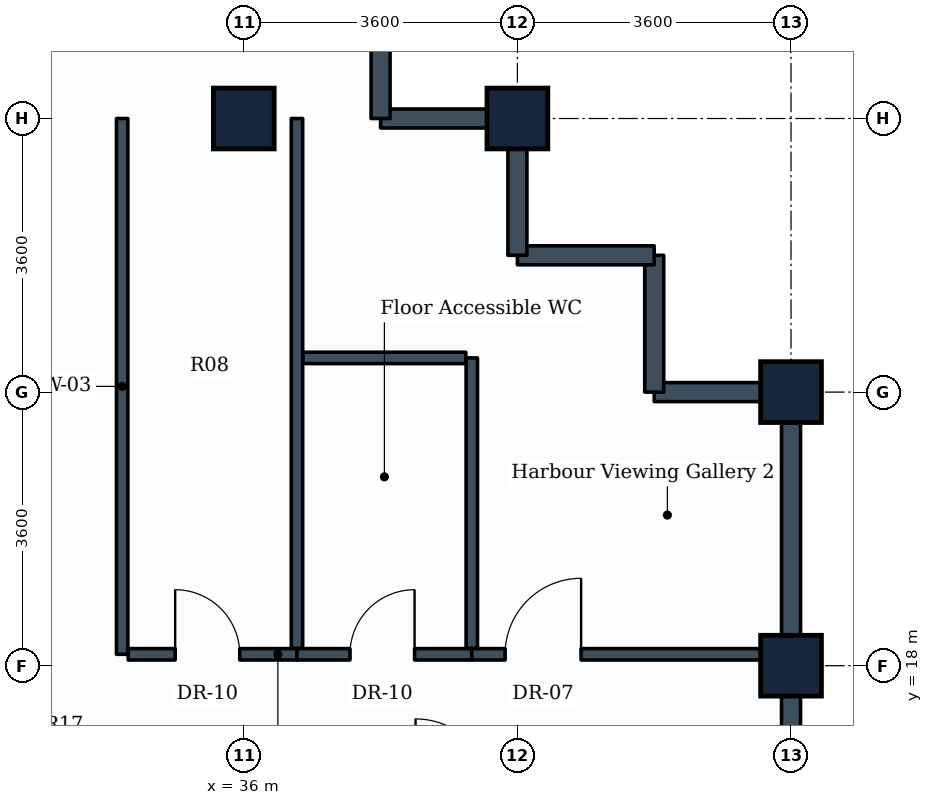
"""IFC4 building model, lengths in metres.
Left out: names, types, materials, properties, quantities, classifications, styles, units other than length and angle.
Written with IfcOpenShell. Run it as: python <this file> out.ifc"""

import sys

from ifc_helpers import new_model, si_unit, direction, frame, frame_2d, origin, origin_2d, place, context, subcontext, project, spatial, rectangle, extrude, element, fill, save


model = new_model("IFC4")
c1 = context("Model", 3, precision=1e-05, world=origin(), true_north=direction((0.0, 1.0)))
c2 = subcontext(c1, "Body", "Model", "MODEL_VIEW")
j1 = project(units=[si_unit("LENGTHUNIT", "METRE"), si_unit("PLANEANGLEUNIT", "RADIAN")], contexts=[c1])
p1 = place(None, origin())
s1 = spatial("IfcSite", under=j1, at=p1, CompositionType="ELEMENT")
p2 = place(p1, origin())
s2 = spatial("IfcBuilding", under=s1, at=p2, CompositionType="ELEMENT")
p3 = place(p2, frame((0.0, 0.0, 246.2)))
s3 = spatial("IfcBuildingStorey", under=s2, at=p3, CompositionType="ELEMENT", Elevation=246.2)
for number, where, z_axis, x_axis in (
    (1, (36.0, 25.2, 0.0), (0.0, 0.0, 1.0), (1.0, 0.0, 0.0)),
    (2, (39.6, 25.2, 0.0), (0.0, 0.0, 1.0), (1.0, 0.0, 0.0)),
    (3, (43.2, 18.0, 0.0), (0.0, 0.0, 1.0), (0.0, 1.0, 0.0)),
    (4, (43.2, 21.6, 0.0), (0.0, 0.0, 1.0), (0.0, 1.0, 0.0)),
):
    element("IfcColumn", number, at=place(p3, frame(where, z_axis=z_axis, x_axis=x_axis)), inside=s3, PredefinedType="COLUMN", context=c2, shape_type="SweptSolid", body=[
        extrude(rectangle(XDim=0.8, YDim=0.8, at=origin_2d()), origin(), (0.0, 0.0, 1.0), 3.6),
    ])
for number, where, z_axis, x_axis in (
    (5, (43.2, 18.0, 0.0), (0.0, 0.0, 1.0), (0.0, -1.0, 0.0)),
    (6, (43.2, 21.6, 0.0), (0.0, 0.0, 1.0), (0.0, -1.0, 0.0)),
):
    element("IfcWall", number, at=place(p3, frame(where, z_axis=z_axis, x_axis=x_axis)), inside=s3, PredefinedType="STANDARD", context=c2, shape_type="SweptSolid", body=[
        extrude(rectangle(XDim=3.6, YDim=0.25, at=frame_2d((1.8, 0.0))), origin(), (0.0, 0.0, 1.0), 2.83),
    ])
p4 = place(p3, frame((41.4, 21.6, 0.0), z_axis=(0.0, 0.0, 1.0), x_axis=(1.0, 0.0, 0.0)))
e7 = element("IfcWall", 7, at=p4, inside=s3, PredefinedType="STANDARD", context=c2, shape_type="SweptSolid", body=[
    extrude(rectangle(XDim=1.8, YDim=0.25, at=frame_2d((0.9, 0.0))), origin(), (0.0, 0.0, 1.0), 2.83),
])
for number, where, z_axis, x_axis in (
    (8, (41.4, 23.4, 0.0), (0.0, 0.0, 1.0), (0.0, -1.0, 0.0)),
    (9, (39.6, 23.4, 0.0), (0.0, 0.0, 1.0), (1.0, 0.0, 0.0)),
):
    element("IfcWall", number, at=place(p3, frame(where, z_axis=z_axis, x_axis=x_axis)), inside=s3, PredefinedType="STANDARD", context=c2, shape_type="SweptSolid", body=[
        extrude(rectangle(XDim=1.8, YDim=0.25, at=frame_2d((0.9, 0.0))), origin(), (0.0, 0.0, 1.0), 3.265),
    ])
for number, where, z_axis, x_axis in (
    (10, (39.6, 25.2, 0.0), (0.0, 0.0, 1.0), (0.0, -1.0, 0.0)),
    (11, (37.8, 25.2, 0.0), (0.0, 0.0, 1.0), (1.0, 0.0, 0.0)),
):
    element("IfcWall", number, at=place(p3, frame(where, z_axis=z_axis, x_axis=x_axis)), inside=s3, PredefinedType="STANDARD", context=c2, shape_type="SweptSolid", body=[
        extrude(rectangle(XDim=1.8, YDim=0.25, at=frame_2d((0.9, 0.0))), origin(), (0.0, 0.0, 1.0), 2.83),
    ])
p5 = place(p3, frame((37.8, 27.3, 0.0), z_axis=(0.0, 0.0, 1.0), x_axis=(0.0, -1.0, 0.0)))
e12 = element("IfcWall", 12, at=p5, inside=s3, PredefinedType="STANDARD", context=c2, shape_type="SweptSolid", body=[
    extrude(rectangle(XDim=2.1, YDim=0.25, at=frame_2d((1.05, 0.0))), origin(), (0.0, 0.0, 1.0), 2.83),
])
p6 = place(p3, frame((34.4, 18.15, 0.0), z_axis=(0.0, 0.0, 1.0), x_axis=(0.0, 1.0, 0.0)))
e13 = element("IfcWall", 13, at=p6, inside=s3, PredefinedType="PARTITIONING", context=c2, shape_type="SweptSolid", body=[
    extrude(rectangle(XDim=7.05, YDim=0.15, at=frame_2d((3.525, 0.0))), origin(), (0.0, 0.0, 1.0), 2.83),
])
p7 = place(p3, frame((34.479, 18.15, 0.0), z_axis=(0.0, 0.0, 1.0), x_axis=(1.0, 0.0, 0.0)))
e14 = element("IfcWall", 14, at=p7, inside=s3, PredefinedType="PARTITIONING", context=c2, shape_type="SweptSolid", body=[
    extrude(rectangle(XDim=2.221, YDim=0.15, at=frame_2d((1.11, 0.0))), origin(), (0.0, 0.0, 1.0), 3.265),
])
p8 = place(p7, frame((0.618, 0.0, 0.0)))
e15 = element("IfcOpeningElement", 15, at=p8, cuts=e14, PredefinedType="OPENING", context=c2, shape_type="SweptSolid", body=[
    extrude(rectangle(XDim=0.85, YDim=2.1, at=frame_2d((0.425, 1.05))), frame((0.0, 0.085, 0.0), z_axis=(0.0, -1.0, 0.0), x_axis=(1.0, 0.0, 0.0)), (0.0, 0.0, 1.0), 0.17),
])
p9 = place(p3, frame((36.7, 18.229, 0.0), z_axis=(0.0, 0.0, 1.0), x_axis=(0.0, 1.0, 0.0)))
e16 = element("IfcWall", 16, at=p9, inside=s3, PredefinedType="PARTITIONING", context=c2, shape_type="SweptSolid", body=[
    extrude(rectangle(XDim=6.971, YDim=0.15, at=frame_2d((3.485, 0.0))), origin(), (0.0, 0.0, 1.0), 2.83),
])
p10 = place(p3, frame((36.7, 18.15, 0.0), z_axis=(0.0, 0.0, 1.0), x_axis=(1.0, 0.0, 0.0)))
e17 = element("IfcWall", 17, at=p10, inside=s3, PredefinedType="PARTITIONING", context=c2, shape_type="SweptSolid", body=[
    extrude(rectangle(XDim=2.3, YDim=0.15, at=frame_2d((1.15, 0.0))), origin(), (0.0, 0.0, 1.0), 3.265),
])
p11 = place(p10, frame((0.697, 0.0, 0.0)))
e18 = element("IfcOpeningElement", 18, at=p11, cuts=e17, PredefinedType="OPENING", context=c2, shape_type="SweptSolid", body=[
    extrude(rectangle(XDim=0.85, YDim=2.1, at=frame_2d((0.425, 1.05))), frame((0.0, 0.085, 0.0), z_axis=(0.0, -1.0, 0.0), x_axis=(1.0, 0.0, 0.0)), (0.0, 0.0, 1.0), 0.17),
])
p12 = place(p3, frame((39.0, 18.229, 0.0), z_axis=(0.0, 0.0, 1.0), x_axis=(0.0, 1.0, 0.0)))
e19 = element("IfcWall", 19, at=p12, inside=s3, PredefinedType="PARTITIONING", context=c2, shape_type="SweptSolid", body=[
    extrude(rectangle(XDim=3.821, YDim=0.15, at=frame_2d((1.911, 0.0))), origin(), (0.0, 0.0, 1.0), 3.265),
])
p13 = place(p3, frame((36.779, 22.05, 0.0), z_axis=(0.0, 0.0, 1.0), x_axis=(1.0, 0.0, 0.0)))
e20 = element("IfcWall", 20, at=p13, inside=s3, PredefinedType="PARTITIONING", context=c2, shape_type="SweptSolid", body=[
    extrude(rectangle(XDim=2.142, YDim=0.15, at=frame_2d((1.071, 0.0))), origin(), (0.0, 0.0, 1.0), 3.265),
])
p14 = place(p3, frame((39.0, 18.15, 0.0), z_axis=(0.0, 0.0, 1.0), x_axis=(1.0, 0.0, 0.0)))
e21 = element("IfcWall", 21, at=p14, inside=s3, PredefinedType="PARTITIONING", context=c2, shape_type="SweptSolid", body=[
    extrude(rectangle(XDim=4.071, YDim=0.15, at=frame_2d((2.036, 0.0))), origin(), (0.0, 0.0, 1.0), 2.83),
])
p15 = place(p14, frame((0.438, 0.0, 0.0)))
e22 = element("IfcOpeningElement", 22, at=p15, cuts=e21, PredefinedType="OPENING", context=c2, shape_type="SweptSolid", body=[
    extrude(rectangle(XDim=1.0, YDim=2.1, at=frame_2d((0.5, 1.05))), frame((0.0, 0.085, 0.0), z_axis=(0.0, -1.0, 0.0), x_axis=(1.0, 0.0, 0.0)), (0.0, 0.0, 1.0), 0.17),
])
p16 = place(p8, origin())
e23 = element("IfcDoor", 23, at=p16, inside=s3, OperationType="SINGLE_SWING_LEFT", PredefinedType="DOOR", context=c2, shape_type="SweptSolid", body=[
    extrude(rectangle(XDim=0.85, YDim=2.1, at=frame_2d((0.425, 1.05))), frame((0.0, 0.025, 0.0), z_axis=(0.0, -1.0, 0.0), x_axis=(1.0, 0.0, 0.0)), (0.0, 0.0, 1.0), 0.05),
])
fill(e15, e23)
p17 = place(p11, origin())
e24 = element("IfcDoor", 24, at=p17, inside=s3, OperationType="SINGLE_SWING_RIGHT", PredefinedType="DOOR", context=c2, shape_type="SweptSolid", body=[
    extrude(rectangle(XDim=0.85, YDim=2.1, at=frame_2d((0.425, 1.05))), frame((0.0, 0.025, 0.0), z_axis=(0.0, -1.0, 0.0), x_axis=(1.0, 0.0, 0.0)), (0.0, 0.0, 1.0), 0.05),
])
fill(e18, e24)
p18 = place(p15, origin())
e25 = element("IfcDoor", 25, at=p18, inside=s3, OperationType="SINGLE_SWING_RIGHT", PredefinedType="DOOR", context=c2, shape_type="SweptSolid", body=[
    extrude(rectangle(XDim=1.0, YDim=2.1, at=frame_2d((0.5, 1.05))), frame((0.0, 0.025, 0.0), z_axis=(0.0, -1.0, 0.0), x_axis=(1.0, 0.0, 0.0)), (0.0, 0.0, 1.0), 0.05),
])
fill(e22, e25)
save(model, sys.argv[1])
